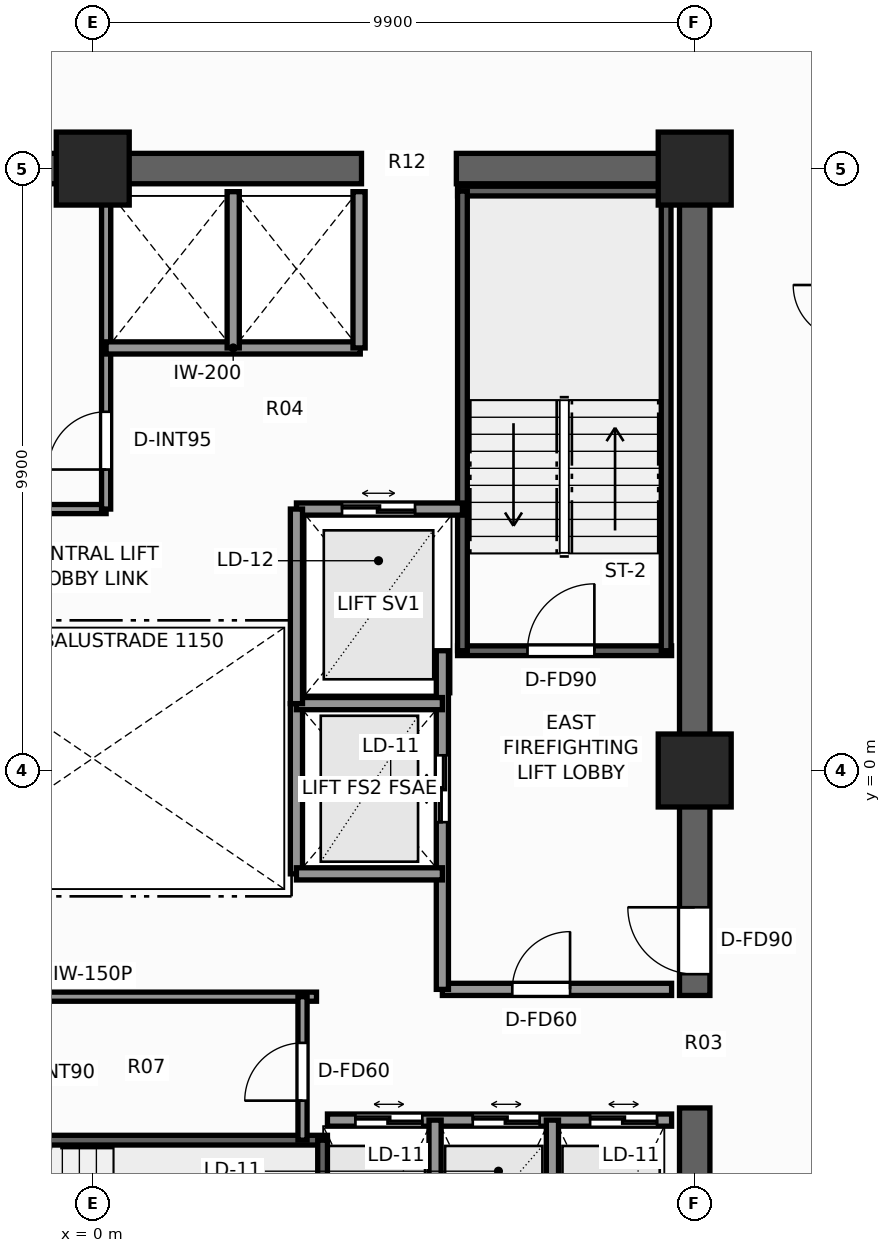
"""IFC4 building model, lengths in metres.
Left out: names, types, materials, properties, quantities, classifications, styles, units other than length and angle.
Written with IfcOpenShell. Run it as: python <this file> out.ifc"""

import sys

from ifc_helpers import new_model, si_unit, direction, frame, frame_2d, origin, origin_2d, place, context, subcontext, project, spatial, rectangle, extrude, element, fill, save


model = new_model("IFC4")
c1 = context("Model", 3, precision=1e-05, world=origin(), true_north=direction((0.0, 1.0)))
c2 = subcontext(c1, "Body", "Model", "MODEL_VIEW")
j1 = project(units=[si_unit("LENGTHUNIT", "METRE"), si_unit("PLANEANGLEUNIT", "RADIAN")], contexts=[c1])
p1 = place(None, origin())
s1 = spatial("IfcSite", under=j1, at=p1, CompositionType="ELEMENT")
p2 = place(p1, origin())
s2 = spatial("IfcBuilding", under=s1, at=p2, CompositionType="ELEMENT")
p3 = place(p2, frame((0.0, 0.0, 160.2)))
s3 = spatial("IfcBuildingStorey", under=s2, at=p3, CompositionType="ELEMENT", Elevation=160.2)
p4 = place(p3, frame((-10.15, 9.9, 0.0), z_axis=(0.0, 0.0, 1.0), x_axis=(1.0, 0.0, 0.0)))
e1 = element("IfcWall", 1, at=p4, inside=s3, PredefinedType="SHEAR", context=c2, shape_type="SweptSolid", body=[
    extrude(rectangle(XDim=14.57, YDim=0.5, at=frame_2d((7.285, 0.0))), origin(), (0.0, 0.0, 1.0), 3.3),
])
p5 = place(p3, frame((5.98, 9.9, 0.0), z_axis=(0.0, 0.0, 1.0), x_axis=(1.0, 0.0, 0.0)))
e2 = element("IfcWall", 2, at=p5, inside=s3, PredefinedType="SHEAR", context=c2, shape_type="SweptSolid", body=[
    extrude(rectangle(XDim=4.17, YDim=0.5, at=frame_2d((2.085, 0.0))), origin(), (0.0, 0.0, 1.0), 3.3),
])
p6 = place(p3, frame((9.9, -9.65, 0.0), z_axis=(0.0, 0.0, 1.0), x_axis=(0.0, 1.0, 0.0)))
e3 = element("IfcWall", 3, at=p6, inside=s3, PredefinedType="SHEAR", context=c2, shape_type="SweptSolid", body=[
    extrude(rectangle(XDim=4.1, YDim=0.5, at=frame_2d((2.05, 0.0))), origin(), (0.0, 0.0, 1.0), 3.3),
])
p7 = place(p3, frame((9.9, -3.7, 0.0), z_axis=(0.0, 0.0, 1.0), x_axis=(0.0, 1.0, 0.0)))
e4 = element("IfcWall", 4, at=p7, inside=s3, PredefinedType="SHEAR", context=c2, shape_type="SweptSolid", body=[
    extrude(rectangle(XDim=13.35, YDim=0.5, at=frame_2d((6.675, 0.0))), origin(), (0.0, 0.0, 1.0), 3.3),
])
p8 = place(p7, frame((0.35, 0.0, 0.0)))
e5 = element("IfcOpeningElement", 5, at=p8, cuts=e4, PredefinedType="OPENING", context=c2, shape_type="SweptSolid", body=[
    extrude(rectangle(XDim=1.1, YDim=2.2, at=frame_2d((0.55, 1.1))), frame((0.0, 0.26, 0.0), z_axis=(0.0, -1.0, 0.0), x_axis=(1.0, 0.0, 0.0)), (0.0, 0.0, 1.0), 0.52),
])
for number, where, z_axis, x_axis in (
    (6, (9.9, 9.9, 0.0), (0.0, 0.0, 1.0), (1.0, 0.0, 0.0)),
    (7, (9.9, 0.0, 0.0), (0.0, 0.0, 1.0), (1.0, 0.0, 0.0)),
    (8, (0.0, 9.9, 0.0), (0.0, 0.0, 1.0), (1.0, 0.0, 0.0)),
):
    element("IfcColumn", number, at=place(p3, frame(where, z_axis=z_axis, x_axis=x_axis)), inside=s3, PredefinedType="COLUMN", context=c2, shape_type="SweptSolid", body=[
        extrude(rectangle(XDim=1.2, YDim=1.2, at=origin_2d()), origin(), (0.0, 0.0, 1.0), 3.3),
    ])
p9 = place(p3, frame((6.0, 1.97, 0.0), z_axis=(0.0, 0.0, 1.0), x_axis=(1.0, 0.0, 0.0)))
e9 = element("IfcWall", 9, at=p9, inside=s3, PredefinedType="SHEAR", context=c2, shape_type="SweptSolid", body=[
    extrude(rectangle(XDim=3.52, YDim=0.16, at=frame_2d((1.76, 0.0))), origin(), (0.0, 0.0, 1.0), 3.3),
])
p10 = place(p9, frame((1.15, 0.0, 0.0)))
e10 = element("IfcOpeningElement", 10, at=p10, cuts=e9, PredefinedType="OPENING", context=c2, shape_type="SweptSolid", body=[
    extrude(rectangle(XDim=1.1, YDim=2.2, at=frame_2d((0.55, 1.1))), frame((0.0, 0.09, 0.0), z_axis=(0.0, -1.0, 0.0), x_axis=(1.0, 0.0, 0.0)), (0.0, 0.0, 1.0), 0.18),
])
p11 = place(p3, frame((6.0, 9.53, 0.0), z_axis=(0.0, 0.0, 1.0), x_axis=(1.0, 0.0, 0.0)))
e11 = element("IfcWall", 11, at=p11, inside=s3, PredefinedType="SHEAR", context=c2, shape_type="SweptSolid", body=[
    extrude(rectangle(XDim=3.52, YDim=0.16, at=frame_2d((1.76, 0.0))), origin(), (0.0, 0.0, 1.0), 3.3),
])
for number, where, z_axis, x_axis in (
    (12, (6.08, 1.97, 0.0), (0.0, 0.0, 1.0), (0.0, 1.0, 0.0)),
    (13, (9.43, 1.97, 0.0), (0.0, 0.0, 1.0), (0.0, 1.0, 0.0)),
):
    element("IfcWall", number, at=place(p3, frame(where, z_axis=z_axis, x_axis=x_axis)), inside=s3, PredefinedType="SHEAR", context=c2, shape_type="SweptSolid", body=[
        extrude(rectangle(XDim=7.56, YDim=0.16, at=frame_2d((3.78, 0.0))), origin(), (0.0, 0.0, 1.0), 3.3),
    ])
p12 = place(p3, frame((-3.86, -6.08, 0.0), z_axis=(0.0, 0.0, 1.0), x_axis=(1.0, 0.0, 0.0)))
e14 = element("IfcWall", 14, at=p12, inside=s3, PredefinedType="SHEAR", context=c2, shape_type="SweptSolid", body=[
    extrude(rectangle(XDim=7.72, YDim=0.16, at=frame_2d((3.86, 0.0))), origin(), (0.0, 0.0, 1.0), 3.3),
])
p13 = place(p3, frame((3.78, -9.43, 0.0), z_axis=(0.0, 0.0, 1.0), x_axis=(0.0, 1.0, 0.0)))
e15 = element("IfcWall", 15, at=p13, inside=s3, PredefinedType="SHEAR", context=c2, shape_type="SweptSolid", body=[
    extrude(rectangle(XDim=3.35, YDim=0.16, at=frame_2d((1.675, 0.0))), origin(), (0.0, 0.0, 1.0), 3.3),
])
p14 = place(p3, frame((5.75, -3.6, 0.0), z_axis=(0.0, 0.0, 1.0), x_axis=(1.0, 0.0, 0.0)))
e16 = element("IfcWall", 16, at=p14, inside=s3, PredefinedType="SOLIDWALL", context=c2, shape_type="SweptSolid", body=[
    extrude(rectangle(XDim=3.77, YDim=0.2, at=frame_2d((1.885, 0.0))), origin(), (0.0, 0.0, 1.0), 3.1),
])
p15 = place(p14, frame((1.15, 0.0, 0.0)))
e17 = element("IfcOpeningElement", 17, at=p15, cuts=e16, PredefinedType="OPENING", context=c2, shape_type="SweptSolid", body=[
    extrude(rectangle(XDim=0.95, YDim=2.06, at=frame_2d((0.475, 1.03))), frame((0.0, 0.11, 0.0), z_axis=(0.0, -1.0, 0.0), x_axis=(1.0, 0.0, 0.0)), (0.0, 0.0, 1.0), 0.22),
])
p16 = place(p3, frame((5.75, -3.6, 0.0), z_axis=(0.0, 0.0, 1.0), x_axis=(0.0, 1.0, 0.0)))
e18 = element("IfcWall", 18, at=p16, inside=s3, PredefinedType="SOLIDWALL", context=c2, shape_type="SweptSolid", body=[
    extrude(rectangle(XDim=5.57, YDim=0.2, at=frame_2d((2.785, 0.0))), origin(), (0.0, 0.0, 1.0), 2.735),
])
p17 = place(p16, frame((2.75, 0.0, 0.0)))
e19 = element("IfcOpeningElement", 19, at=p17, cuts=e18, PredefinedType="OPENING", context=c2, shape_type="SweptSolid", body=[
    extrude(rectangle(XDim=1.1, YDim=2.2, at=frame_2d((0.55, 1.1))), frame((0.0, 0.11, 0.0), z_axis=(0.0, -1.0, 0.0), x_axis=(1.0, 0.0, 0.0)), (0.0, 0.0, 1.0), 0.22),
])
p18 = place(p3, frame((3.35, -1.7, 0.0), z_axis=(0.0, 0.0, 1.0), x_axis=(0.0, 1.0, 0.0)))
e20 = element("IfcWall", 20, at=p18, inside=s3, PredefinedType="SOLIDWALL", context=c2, shape_type="SweptSolid", body=[
    extrude(rectangle(XDim=2.8, YDim=0.2, at=frame_2d((1.4, 0.0))), origin(), (0.0, 0.0, 1.0), 2.735),
])
for number, where, z_axis, x_axis in (
    (21, (3.35, -1.7, 0.0), (0.0, 0.0, 1.0), (1.0, 0.0, 0.0)),
    (22, (3.35, 1.1, 0.0), (0.0, 0.0, 1.0), (1.0, 0.0, 0.0)),
):
    element("IfcWall", number, at=place(p3, frame(where, z_axis=z_axis, x_axis=x_axis)), inside=s3, PredefinedType="SOLIDWALL", context=c2, shape_type="SweptSolid", body=[
        extrude(rectangle(XDim=2.4, YDim=0.2, at=frame_2d((1.2, 0.0))), origin(), (0.0, 0.0, 1.0), 3.1),
    ])
p19 = place(p3, frame((3.35, 4.3, 0.0), z_axis=(0.0, 0.0, 1.0), x_axis=(1.0, 0.0, 0.0)))
e23 = element("IfcWall", 23, at=p19, inside=s3, PredefinedType="SOLIDWALL", context=c2, shape_type="SweptSolid", body=[
    extrude(rectangle(XDim=2.73, YDim=0.2, at=frame_2d((1.365, 0.0))), origin(), (0.0, 0.0, 1.0), 3.1),
])
p20 = place(p19, frame((0.75, 0.0, 0.0)))
e24 = element("IfcOpeningElement", 24, at=p20, cuts=e23, PredefinedType="OPENING", context=c2, shape_type="SweptSolid", body=[
    extrude(rectangle(XDim=1.2, YDim=2.25, at=frame_2d((0.6, 1.125))), frame((0.0, 0.11, 0.0), z_axis=(0.0, -1.0, 0.0), x_axis=(1.0, 0.0, 0.0)), (0.0, 0.0, 1.0), 0.22),
])
p21 = place(p3, frame((3.35, 1.1, 0.0), z_axis=(0.0, 0.0, 1.0), x_axis=(0.0, 1.0, 0.0)))
e25 = element("IfcWall", 25, at=p21, inside=s3, PredefinedType="SOLIDWALL", context=c2, shape_type="SweptSolid", body=[
    extrude(rectangle(XDim=3.2, YDim=0.2, at=frame_2d((1.6, 0.0))), origin(), (0.0, 0.0, 1.0), 2.735),
])
p22 = place(p3, frame((-6.08, 4.3, 0.0), z_axis=(0.0, 0.0, 1.0), x_axis=(1.0, 0.0, 0.0)))
e26 = element("IfcWall", 26, at=p22, inside=s3, PredefinedType="PARTITIONING", context=c2, shape_type="SweptSolid", body=[
    extrude(rectangle(XDim=6.3, YDim=0.15, at=frame_2d((3.15, 0.0))), origin(), (0.0, 0.0, 1.0), 3.1),
])
p23 = place(p3, frame((0.22, 4.3, 0.0), z_axis=(0.0, 0.0, 1.0), x_axis=(0.0, 1.0, 0.0)))
e27 = element("IfcWall", 27, at=p23, inside=s3, PredefinedType="PARTITIONING", context=c2, shape_type="SweptSolid", body=[
    extrude(rectangle(XDim=5.22, YDim=0.15, at=frame_2d((2.61, 0.0))), origin(), (0.0, 0.0, 1.0), 3.1),
])
p24 = place(p23, frame((0.65, 0.0, 0.0)))
e28 = element("IfcOpeningElement", 28, at=p24, cuts=e27, PredefinedType="OPENING", context=c2, shape_type="SweptSolid", body=[
    extrude(rectangle(XDim=0.95, YDim=2.06, at=frame_2d((0.475, 1.03))), frame((0.0, 0.085, 0.0), z_axis=(0.0, -1.0, 0.0), x_axis=(1.0, 0.0, 0.0)), (0.0, 0.0, 1.0), 0.17),
])
p25 = place(p3, frame((0.22, 6.95, 0.0), z_axis=(0.0, 0.0, 1.0), x_axis=(1.0, 0.0, 0.0)))
e29 = element("IfcWall", 29, at=p25, inside=s3, PredefinedType="SOLIDWALL", context=c2, shape_type="SweptSolid", body=[
    extrude(rectangle(XDim=4.18, YDim=0.2, at=frame_2d((2.09, 0.0))), origin(), (0.0, 0.0, 1.0), 3.1),
])
for number, where, z_axis, x_axis in (
    (30, (4.38, 6.95, 0.0), (0.0, 0.0, 1.0), (0.0, 1.0, 0.0)),
    (31, (2.31, 6.95, 0.0), (0.0, 0.0, 1.0), (0.0, 1.0, 0.0)),
):
    element("IfcWall", number, at=place(p3, frame(where, z_axis=z_axis, x_axis=x_axis)), inside=s3, PredefinedType="SOLIDWALL", context=c2, shape_type="SweptSolid", body=[
        extrude(rectangle(XDim=2.57, YDim=0.2, at=frame_2d((1.285, 0.0))), origin(), (0.0, 0.0, 1.0), 3.1),
    ])
p26 = place(p3, frame((3.86, -5.75, 0.0), z_axis=(0.0, 0.0, 1.0), x_axis=(1.0, 0.0, 0.0)))
e32 = element("IfcWall", 32, at=p26, inside=s3, PredefinedType="SOLIDWALL", context=c2, shape_type="SweptSolid", body=[
    extrude(rectangle(XDim=5.66, YDim=0.2, at=frame_2d((2.83, 0.0))), origin(), (0.0, 0.0, 1.0), 3.1),
])
p27 = place(p26, frame((0.46, 0.0, 0.0)))
e33 = element("IfcOpeningElement", 33, at=p27, cuts=e32, PredefinedType="OPENING", context=c2, shape_type="SweptSolid", body=[
    extrude(rectangle(XDim=1.1, YDim=2.2, at=frame_2d((0.55, 1.1))), frame((0.0, 0.11, 0.0), z_axis=(0.0, -1.0, 0.0), x_axis=(1.0, 0.0, 0.0)), (0.0, 0.0, 1.0), 0.22),
])
p28 = place(p26, frame((2.39, 0.0, 0.0)))
e34 = element("IfcOpeningElement", 34, at=p28, cuts=e32, PredefinedType="OPENING", context=c2, shape_type="SweptSolid", body=[
    extrude(rectangle(XDim=1.1, YDim=2.2, at=frame_2d((0.55, 1.1))), frame((0.0, 0.11, 0.0), z_axis=(0.0, -1.0, 0.0), x_axis=(1.0, 0.0, 0.0)), (0.0, 0.0, 1.0), 0.22),
])
p29 = place(p26, frame((4.32, 0.0, 0.0)))
e35 = element("IfcOpeningElement", 35, at=p29, cuts=e32, PredefinedType="OPENING", context=c2, shape_type="SweptSolid", body=[
    extrude(rectangle(XDim=1.1, YDim=2.2, at=frame_2d((0.55, 1.1))), frame((0.0, 0.11, 0.0), z_axis=(0.0, -1.0, 0.0), x_axis=(1.0, 0.0, 0.0)), (0.0, 0.0, 1.0), 0.22),
])
for number, where, z_axis, x_axis in (
    (36, (5.63, -9.52, 0.0), (0.0, 0.0, 1.0), (0.0, 1.0, 0.0)),
    (37, (7.56, -9.52, 0.0), (0.0, 0.0, 1.0), (0.0, 1.0, 0.0)),
):
    element("IfcWall", number, at=place(p3, frame(where, z_axis=z_axis, x_axis=x_axis)), inside=s3, PredefinedType="SOLIDWALL", context=c2, shape_type="SweptSolid", body=[
        extrude(rectangle(XDim=3.77, YDim=0.2, at=frame_2d((1.885, 0.0))), origin(), (0.0, 0.0, 1.0), 3.1),
    ])
p30 = place(p3, frame((-3.68, -3.72, 0.0), z_axis=(0.0, 0.0, 1.0), x_axis=(1.0, 0.0, 0.0)))
e38 = element("IfcWall", 38, at=p30, inside=s3, PredefinedType="PARTITIONING", context=c2, shape_type="SweptSolid", body=[
    extrude(rectangle(XDim=7.36, YDim=0.15, at=frame_2d((3.68, 0.0))), origin(), (0.0, 0.0, 1.0), 3.1),
])
p31 = place(p3, frame((3.45, -6.08, 0.0), z_axis=(0.0, 0.0, 1.0), x_axis=(0.0, 1.0, 0.0)))
e39 = element("IfcWall", 39, at=p31, inside=s3, PredefinedType="PARTITIONING", context=c2, shape_type="SweptSolid", body=[
    extrude(rectangle(XDim=2.36, YDim=0.15, at=frame_2d((1.18, 0.0))), origin(), (0.0, 0.0, 1.0), 3.1),
])
p32 = place(p31, frame((0.65, 0.0, 0.0)))
e40 = element("IfcOpeningElement", 40, at=p32, cuts=e39, PredefinedType="OPENING", context=c2, shape_type="SweptSolid", body=[
    extrude(rectangle(XDim=0.95, YDim=2.06, at=frame_2d((0.475, 1.03))), frame((0.0, 0.085, 0.0), z_axis=(0.0, -1.0, 0.0), x_axis=(1.0, 0.0, 0.0)), (0.0, 0.0, 1.0), 0.17),
])
p33 = place(p10, origin())
e41 = element("IfcDoor", 41, at=p33, inside=s3, OperationType="SINGLE_SWING_RIGHT", PredefinedType="DOOR", context=c2, shape_type="SweptSolid", body=[
    extrude(rectangle(XDim=1.1, YDim=2.2, at=frame_2d((0.55, 1.1))), frame((0.0, 0.025, 0.0), z_axis=(0.0, -1.0, 0.0), x_axis=(1.0, 0.0, 0.0)), (0.0, 0.0, 1.0), 0.05),
])
fill(e10, e41)
p34 = place(p8, origin())
e42 = element("IfcDoor", 42, at=p34, inside=s3, OperationType="SINGLE_SWING_RIGHT", PredefinedType="DOOR", context=c2, shape_type="SweptSolid", body=[
    extrude(rectangle(XDim=1.1, YDim=2.2, at=frame_2d((0.55, 1.1))), frame((0.0, 0.025, 0.0), z_axis=(0.0, -1.0, 0.0), x_axis=(1.0, 0.0, 0.0)), (0.0, 0.0, 1.0), 0.05),
])
fill(e5, e42)
p35 = place(p17, origin())
e43 = element("IfcDoor", 43, at=p35, inside=s3, OperationType="DOUBLE_DOOR_SLIDING", PredefinedType="DOOR", context=c2, shape_type="SweptSolid", body=[
    extrude(rectangle(XDim=1.1, YDim=2.2, at=frame_2d((0.55, 1.1))), frame((0.0, 0.025, 0.0), z_axis=(0.0, -1.0, 0.0), x_axis=(1.0, 0.0, 0.0)), (0.0, 0.0, 1.0), 0.05),
])
fill(e19, e43)
p36 = place(p20, origin())
e44 = element("IfcDoor", 44, at=p36, inside=s3, OperationType="DOUBLE_DOOR_SLIDING", PredefinedType="DOOR", context=c2, shape_type="SweptSolid", body=[
    extrude(rectangle(XDim=1.2, YDim=2.25, at=frame_2d((0.6, 1.125))), frame((0.0, 0.025, 0.0), z_axis=(0.0, -1.0, 0.0), x_axis=(1.0, 0.0, 0.0)), (0.0, 0.0, 1.0), 0.05),
])
fill(e24, e44)
p37 = place(p24, origin())
e45 = element("IfcDoor", 45, at=p37, inside=s3, OperationType="SINGLE_SWING_LEFT", PredefinedType="DOOR", context=c2, shape_type="SweptSolid", body=[
    extrude(rectangle(XDim=0.95, YDim=2.06, at=frame_2d((0.475, 1.03))), frame((0.0, 0.025, 0.0), z_axis=(0.0, -1.0, 0.0), x_axis=(1.0, 0.0, 0.0)), (0.0, 0.0, 1.0), 0.05),
])
fill(e28, e45)
p38 = place(p27, origin())
e46 = element("IfcDoor", 46, at=p38, inside=s3, OperationType="DOUBLE_DOOR_SLIDING", PredefinedType="DOOR", context=c2, shape_type="SweptSolid", body=[
    extrude(rectangle(XDim=1.1, YDim=2.2, at=frame_2d((0.55, 1.1))), frame((0.0, 0.025, 0.0), z_axis=(0.0, -1.0, 0.0), x_axis=(1.0, 0.0, 0.0)), (0.0, 0.0, 1.0), 0.05),
])
fill(e33, e46)
p39 = place(p28, origin())
e47 = element("IfcDoor", 47, at=p39, inside=s3, OperationType="DOUBLE_DOOR_SLIDING", PredefinedType="DOOR", context=c2, shape_type="SweptSolid", body=[
    extrude(rectangle(XDim=1.1, YDim=2.2, at=frame_2d((0.55, 1.1))), frame((0.0, 0.025, 0.0), z_axis=(0.0, -1.0, 0.0), x_axis=(1.0, 0.0, 0.0)), (0.0, 0.0, 1.0), 0.05),
])
fill(e34, e47)
p40 = place(p29, origin())
e48 = element("IfcDoor", 48, at=p40, inside=s3, OperationType="DOUBLE_DOOR_SLIDING", PredefinedType="DOOR", context=c2, shape_type="SweptSolid", body=[
    extrude(rectangle(XDim=1.1, YDim=2.2, at=frame_2d((0.55, 1.1))), frame((0.0, 0.025, 0.0), z_axis=(0.0, -1.0, 0.0), x_axis=(1.0, 0.0, 0.0)), (0.0, 0.0, 1.0), 0.05),
])
fill(e35, e48)
p41 = place(p15, origin())
e49 = element("IfcDoor", 49, at=p41, inside=s3, OperationType="SINGLE_SWING_RIGHT", PredefinedType="DOOR", context=c2, shape_type="SweptSolid", body=[
    extrude(rectangle(XDim=0.95, YDim=2.06, at=frame_2d((0.475, 1.03))), frame((0.0, 0.025, 0.0), z_axis=(0.0, -1.0, 0.0), x_axis=(1.0, 0.0, 0.0)), (0.0, 0.0, 1.0), 0.05),
])
fill(e17, e49)
p42 = place(p32, origin())
e50 = element("IfcDoor", 50, at=p42, inside=s3, OperationType="SINGLE_SWING_LEFT", PredefinedType="DOOR", context=c2, shape_type="SweptSolid", body=[
    extrude(rectangle(XDim=0.95, YDim=2.06, at=frame_2d((0.475, 1.03))), frame((0.0, 0.025, 0.0), z_axis=(0.0, -1.0, 0.0), x_axis=(1.0, 0.0, 0.0)), (0.0, 0.0, 1.0), 0.05),
])
fill(e40, e50)
save(model, sys.argv[1])
